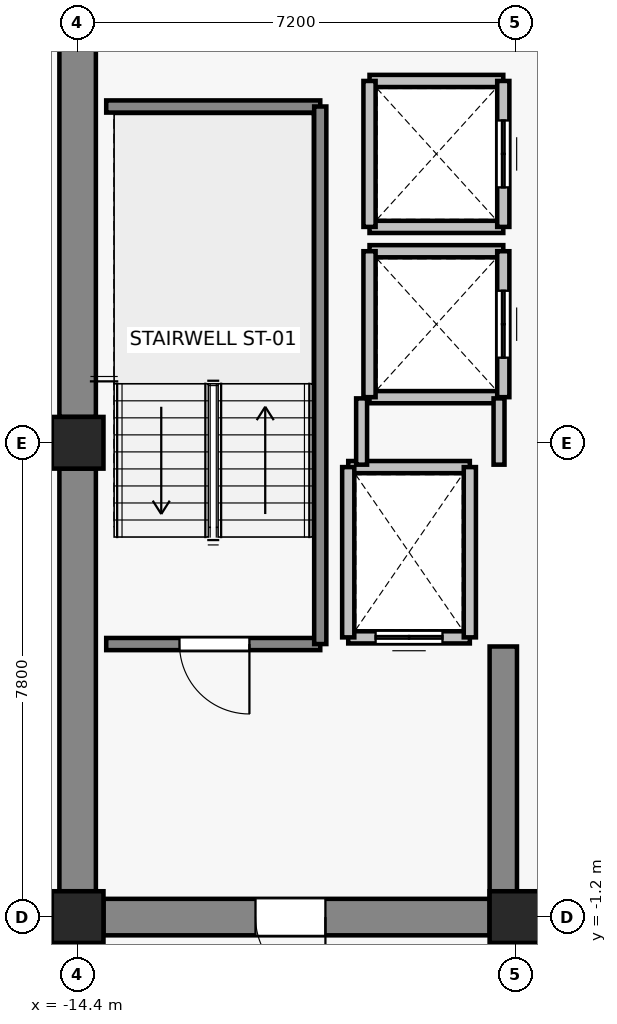
"""IFC4 building model, lengths in metres.
Left out: names, types, materials, properties, quantities, classifications, styles, units other than length and angle.
Written with IfcOpenShell. Run it as: python <this file> out.ifc"""

import sys

from ifc_helpers import new_model, si_unit, direction, frame, frame_2d, origin, origin_2d, place, context, subcontext, project, spatial, rectangle, extrude, source, transform, mapped, element, fill, save


model = new_model("IFC4")
c1 = context("Model", 3, precision=1e-05, world=origin(), true_north=direction((0.0, 1.0)))
c2 = subcontext(c1, "Body", "Model", "MODEL_VIEW")
j1 = project(units=[si_unit("LENGTHUNIT", "METRE"), si_unit("PLANEANGLEUNIT", "RADIAN")], contexts=[c1])
p1 = place(None, origin())
s1 = spatial("IfcSite", under=j1, at=p1, CompositionType="ELEMENT")
p2 = place(p1, origin())
s2 = spatial("IfcBuilding", under=s1, at=p2, CompositionType="ELEMENT")
p3 = place(p2, frame((0.0, 0.0, 228.7)))
s3 = spatial("IfcBuildingStorey", under=s2, at=p3, CompositionType="ELEMENT", Elevation=228.7)
for number, where, z_axis, x_axis in (
    (1, (-14.4, -1.2, 0.0), (0.0, 0.0, 1.0), (1.0, 0.0, 0.0)),
    (2, (-7.2, -1.2, 0.0), (0.0, 0.0, 1.0), (1.0, 0.0, 0.0)),
    (3, (-14.4, 6.6, 0.0), (0.0, 0.0, 1.0), (1.0, 0.0, 0.0)),
):
    element("IfcColumn", number, at=place(p3, frame(where, z_axis=z_axis, x_axis=x_axis)), inside=s3, PredefinedType="COLUMN", context=c2, shape_type="SweptSolid", body=[
        extrude(rectangle(XDim=0.85, YDim=0.85, at=origin_2d()), origin(), (0.0, 0.0, 1.0), 3.3),
    ])
p4 = place(p3, frame((-14.4, -0.775, 0.0), z_axis=(0.0, 0.0, 1.0), x_axis=(0.0, 1.0, 0.0)))
e4 = element("IfcWall", 4, at=p4, inside=s3, PredefinedType="SHEAR", context=c2, shape_type="SweptSolid", body=[
    extrude(rectangle(XDim=6.95, YDim=0.6, at=frame_2d((3.475, 0.0))), origin(), (0.0, 0.0, 1.0), 3.075),
])
p5 = place(p3, frame((-14.4, 7.025, 0.0), z_axis=(0.0, 0.0, 1.0), x_axis=(0.0, 1.0, 0.0)))
e5 = element("IfcWall", 5, at=p5, inside=s3, PredefinedType="SHEAR", context=c2, shape_type="SweptSolid", body=[
    extrude(rectangle(XDim=6.05, YDim=0.6, at=frame_2d((3.025, 0.0))), origin(), (0.0, 0.0, 1.0), 3.075),
])
p6 = place(p3, frame((-7.625, -1.2, 0.0), z_axis=(0.0, 0.0, 1.0), x_axis=(-1.0, 0.0, 0.0)))
e6 = element("IfcWall", 6, at=p6, inside=s3, PredefinedType="SHEAR", context=c2, shape_type="SweptSolid", body=[
    extrude(rectangle(XDim=6.35, YDim=0.6, at=frame_2d((3.175, 0.0))), origin(), (0.0, 0.0, 1.0), 3.075),
])
p7 = place(p6, frame((2.7, 0.0, 0.0)))
e7 = element("IfcOpeningElement", 7, at=p7, cuts=e6, PredefinedType="OPENING", context=c2, shape_type="SweptSolid", body=[
    extrude(rectangle(XDim=1.15, YDim=2.15, at=frame_2d((0.575, 1.075))), frame((0.0, 0.31, 0.0), z_axis=(0.0, -1.0, 0.0), x_axis=(1.0, 0.0, 0.0)), (0.0, 0.0, 1.0), 0.62),
])
p8 = place(p3, frame((-7.4, -0.9, 0.0), z_axis=(0.0, 0.0, 1.0), x_axis=(0.0, 1.0, 0.0)))
e8 = element("IfcWall", 8, at=p8, inside=s3, PredefinedType="SHEAR", context=c2, shape_type="SweptSolid", body=[
    extrude(rectangle(XDim=4.15, YDim=0.45, at=frame_2d((2.075, 0.0))), origin(), (0.0, 0.0, 1.0), 3.075),
])
p9 = place(p3, frame((-7.95, 3.4, 0.0), z_axis=(0.0, 0.0, 1.0), x_axis=(-1.0, 0.0, 0.0)))
e9 = element("IfcWall", 9, at=p9, inside=s3, PredefinedType="SOLIDWALL", context=c2, shape_type="SweptSolid", body=[
    extrude(rectangle(XDim=2.0, YDim=0.2, at=frame_2d((1.0, 0.0))), origin(), (0.0, 0.0, 1.0), 3.075),
])
p10 = place(p9, frame((0.45, 0.0, 0.0)))
e10 = element("IfcOpeningElement", 10, at=p10, cuts=e9, PredefinedType="OPENING", context=c2, shape_type="SweptSolid", body=[
    extrude(rectangle(XDim=1.1, YDim=2.2, at=frame_2d((0.55, 1.1))), frame((0.0, 0.11, 0.0), z_axis=(0.0, -1.0, 0.0), x_axis=(1.0, 0.0, 0.0)), (0.0, 0.0, 1.0), 0.22),
])
p11 = place(p3, frame((-9.95, 6.2, 0.0), z_axis=(0.0, 0.0, 1.0), x_axis=(1.0, 0.0, 0.0)))
e11 = element("IfcWall", 11, at=p11, inside=s3, PredefinedType="SOLIDWALL", context=c2, shape_type="SweptSolid", body=[
    extrude(rectangle(XDim=2.0, YDim=0.2, at=frame_2d((1.0, 0.0))), origin(), (0.0, 0.0, 1.0), 3.075),
])
for number, where, z_axis, x_axis in (
    (12, (-9.95, 3.4, 0.0), (0.0, 0.0, 1.0), (0.0, 1.0, 0.0)),
    (13, (-7.95, 6.2, 0.0), (0.0, 0.0, 1.0), (0.0, -1.0, 0.0)),
):
    element("IfcWall", number, at=place(p3, frame(where, z_axis=z_axis, x_axis=x_axis)), inside=s3, PredefinedType="SOLIDWALL", context=c2, shape_type="SweptSolid", body=[
        extrude(rectangle(XDim=2.8, YDim=0.2, at=frame_2d((1.4, 0.0))), origin(), (0.0, 0.0, 1.0), 3.075),
    ])
for number, where, z_axis, x_axis in (
    (14, (-7.4, 7.35, 0.0), (0.0, 0.0, 1.0), (-1.0, 0.0, 0.0)),
    (15, (-9.6, 9.75, 0.0), (0.0, 0.0, 1.0), (1.0, 0.0, 0.0)),
):
    element("IfcWall", number, at=place(p3, frame(where, z_axis=z_axis, x_axis=x_axis)), inside=s3, PredefinedType="SOLIDWALL", context=c2, shape_type="SweptSolid", body=[
        extrude(rectangle(XDim=2.2, YDim=0.2, at=frame_2d((1.1, 0.0))), origin(), (0.0, 0.0, 1.0), 2.615),
    ])
p12 = place(p3, frame((-9.6, 7.35, 0.0), z_axis=(0.0, 0.0, 1.0), x_axis=(0.0, 1.0, 0.0)))
e16 = element("IfcWall", 16, at=p12, inside=s3, PredefinedType="SOLIDWALL", context=c2, shape_type="SweptSolid", body=[
    extrude(rectangle(XDim=2.4, YDim=0.2, at=frame_2d((1.2, 0.0))), origin(), (0.0, 0.0, 1.0), 3.075),
])
p13 = place(p3, frame((-7.4, 9.75, 0.0), z_axis=(0.0, 0.0, 1.0), x_axis=(0.0, -1.0, 0.0)))
e17 = element("IfcWall", 17, at=p13, inside=s3, PredefinedType="SOLIDWALL", context=c2, shape_type="SweptSolid", body=[
    extrude(rectangle(XDim=2.4, YDim=0.2, at=frame_2d((1.2, 0.0))), origin(), (0.0, 0.0, 1.0), 2.615),
])
p14 = place(p13, frame((0.65, 0.0, 0.0)))
e18 = element("IfcOpeningElement", 18, at=p14, cuts=e17, PredefinedType="OPENING", context=c2, shape_type="SweptSolid", body=[
    extrude(rectangle(XDim=1.1, YDim=2.2, at=frame_2d((0.55, 1.1))), frame((0.0, 0.11, 0.0), z_axis=(0.0, -1.0, 0.0), x_axis=(1.0, 0.0, 0.0)), (0.0, 0.0, 1.0), 0.22),
])
for number, where, z_axis, x_axis in (
    (19, (-7.4, 10.15, 0.0), (0.0, 0.0, 1.0), (-1.0, 0.0, 0.0)),
    (20, (-9.6, 12.55, 0.0), (0.0, 0.0, 1.0), (1.0, 0.0, 0.0)),
):
    element("IfcWall", number, at=place(p3, frame(where, z_axis=z_axis, x_axis=x_axis)), inside=s3, PredefinedType="SOLIDWALL", context=c2, shape_type="SweptSolid", body=[
        extrude(rectangle(XDim=2.2, YDim=0.2, at=frame_2d((1.1, 0.0))), origin(), (0.0, 0.0, 1.0), 2.615),
    ])
p15 = place(p3, frame((-9.6, 10.15, 0.0), z_axis=(0.0, 0.0, 1.0), x_axis=(0.0, 1.0, 0.0)))
e21 = element("IfcWall", 21, at=p15, inside=s3, PredefinedType="SOLIDWALL", context=c2, shape_type="SweptSolid", body=[
    extrude(rectangle(XDim=2.4, YDim=0.2, at=frame_2d((1.2, 0.0))), origin(), (0.0, 0.0, 1.0), 3.075),
])
p16 = place(p3, frame((-7.4, 12.55, 0.0), z_axis=(0.0, 0.0, 1.0), x_axis=(0.0, -1.0, 0.0)))
e22 = element("IfcWall", 22, at=p16, inside=s3, PredefinedType="SOLIDWALL", context=c2, shape_type="SweptSolid", body=[
    extrude(rectangle(XDim=2.4, YDim=0.2, at=frame_2d((1.2, 0.0))), origin(), (0.0, 0.0, 1.0), 2.615),
])
p17 = place(p16, frame((0.65, 0.0, 0.0)))
e23 = element("IfcOpeningElement", 23, at=p17, cuts=e22, PredefinedType="OPENING", context=c2, shape_type="SweptSolid", body=[
    extrude(rectangle(XDim=1.1, YDim=2.2, at=frame_2d((0.55, 1.1))), frame((0.0, 0.11, 0.0), z_axis=(0.0, -1.0, 0.0), x_axis=(1.0, 0.0, 0.0)), (0.0, 0.0, 1.0), 0.22),
])
p18 = place(p3, frame((-10.41, 3.29, 0.0), z_axis=(0.0, 0.0, 1.0), x_axis=(-1.0, 0.0, 0.0)))
e24 = element("IfcWall", 24, at=p18, inside=s3, PredefinedType="SOLIDWALL", context=c2, shape_type="SweptSolid", body=[
    extrude(rectangle(XDim=3.52, YDim=0.2, at=frame_2d((1.76, 0.0))), origin(), (0.0, 0.0, 1.0), 3.075),
])
p19 = place(p18, frame((1.165, 0.0, 0.0)))
e25 = element("IfcOpeningElement", 25, at=p19, cuts=e24, PredefinedType="OPENING", context=c2, shape_type="SweptSolid", body=[
    extrude(rectangle(XDim=1.15, YDim=2.15, at=frame_2d((0.575, 1.075))), frame((0.0, 0.11, 0.0), z_axis=(0.0, -1.0, 0.0), x_axis=(1.0, 0.0, 0.0)), (0.0, 0.0, 1.0), 0.22),
])
p20 = place(p3, frame((-13.93, 12.13, 0.0), z_axis=(0.0, 0.0, 1.0), x_axis=(1.0, 0.0, 0.0)))
e26 = element("IfcWall", 26, at=p20, inside=s3, PredefinedType="SOLIDWALL", context=c2, shape_type="SweptSolid", body=[
    extrude(rectangle(XDim=3.52, YDim=0.2, at=frame_2d((1.76, 0.0))), origin(), (0.0, 0.0, 1.0), 3.075),
])
p21 = place(p3, frame((-10.41, 12.13, 0.0), z_axis=(0.0, 0.0, 1.0), x_axis=(0.0, -1.0, 0.0)))
e27 = element("IfcWall", 27, at=p21, inside=s3, PredefinedType="SOLIDWALL", context=c2, shape_type="SweptSolid", body=[
    extrude(rectangle(XDim=8.84, YDim=0.2, at=frame_2d((4.42, 0.0))), origin(), (0.0, 0.0, 1.0), 3.075),
])
p22 = place(p3, frame((-9.73, 6.24, 0.0), z_axis=(0.0, 0.0, 1.0), x_axis=(0.0, 1.0, 0.0)))
e28 = element("IfcWall", 28, at=p22, inside=s3, PredefinedType="PARTITIONING", context=c2, shape_type="SweptSolid", body=[
    extrude(rectangle(XDim=1.09, YDim=0.18, at=frame_2d((0.545, 0.0))), origin(), (0.0, 0.0, 1.0), 3.075),
])
p23 = place(p3, frame((-7.47, 7.33, 0.0), z_axis=(0.0, 0.0, 1.0), x_axis=(0.0, -1.0, 0.0)))
e29 = element("IfcWall", 29, at=p23, inside=s3, PredefinedType="PARTITIONING", context=c2, shape_type="SweptSolid", body=[
    extrude(rectangle(XDim=1.09, YDim=0.18, at=frame_2d((0.545, 0.0))), origin(), (0.0, 0.0, 1.0), 2.615),
])
m1 = source(origin(), c2, "Body", "SweptSolid", [
    extrude(rectangle(XDim=1.1, YDim=2.2, at=frame_2d((0.55, 1.1))), frame((0.0, 0.025, 0.0), z_axis=(0.0, -1.0, 0.0), x_axis=(1.0, 0.0, 0.0)), (0.0, 0.0, 1.0), 0.05),
])
p24 = place(p10, origin())
e30 = element("IfcDoor", 30, at=p24, inside=s3, OperationType="DOUBLE_DOOR_SLIDING", PredefinedType="DOOR", context=c2, shape_type="MappedRepresentation", body=[
    mapped(m1, transform((0.0, 0.0, 0.0), x_axis=(1.0, 0.0, 0.0), y_axis=(0.0, 1.0, 0.0), z_axis=(0.0, 0.0, 1.0), scale=1.0)),
])
fill(e10, e30)
p25 = place(p14, origin())
e31 = element("IfcDoor", 31, at=p25, inside=s3, OperationType="DOUBLE_DOOR_SLIDING", PredefinedType="DOOR", context=c2, shape_type="MappedRepresentation", body=[
    mapped(m1, transform((0.0, 0.0, 0.0), x_axis=(1.0, 0.0, 0.0), y_axis=(0.0, 1.0, 0.0), z_axis=(0.0, 0.0, 1.0), scale=1.0)),
])
fill(e18, e31)
p26 = place(p17, origin())
e32 = element("IfcDoor", 32, at=p26, inside=s3, OperationType="DOUBLE_DOOR_SLIDING", PredefinedType="DOOR", context=c2, shape_type="MappedRepresentation", body=[
    mapped(m1, transform((0.0, 0.0, 0.0), x_axis=(1.0, 0.0, 0.0), y_axis=(0.0, 1.0, 0.0), z_axis=(0.0, 0.0, 1.0), scale=1.0)),
])
fill(e23, e32)
m2 = source(origin(), c2, "Body", "SweptSolid", [
    extrude(rectangle(XDim=1.15, YDim=2.15, at=frame_2d((0.575, 1.075))), frame((0.0, 0.025, 0.0), z_axis=(0.0, -1.0, 0.0), x_axis=(1.0, 0.0, 0.0)), (0.0, 0.0, 1.0), 0.05),
])
p27 = place(p19, origin())
e33 = element("IfcDoor", 33, at=p27, inside=s3, OperationType="SINGLE_SWING_LEFT", PredefinedType="DOOR", context=c2, shape_type="MappedRepresentation", body=[
    mapped(m2, transform((0.0, 0.0, 0.0), x_axis=(1.0, 0.0, 0.0), y_axis=(0.0, 1.0, 0.0), z_axis=(0.0, 0.0, 1.0), scale=1.0)),
])
fill(e25, e33)
p28 = place(p7, origin())
e34 = element("IfcDoor", 34, at=p28, inside=s3, OperationType="SINGLE_SWING_LEFT", PredefinedType="DOOR", context=c2, shape_type="MappedRepresentation", body=[
    mapped(m2, transform((0.0, 0.0, 0.0), x_axis=(1.0, 0.0, 0.0), y_axis=(0.0, 1.0, 0.0), z_axis=(0.0, 0.0, 1.0), scale=1.0)),
])
fill(e7, e34)
save(model, sys.argv[1])
